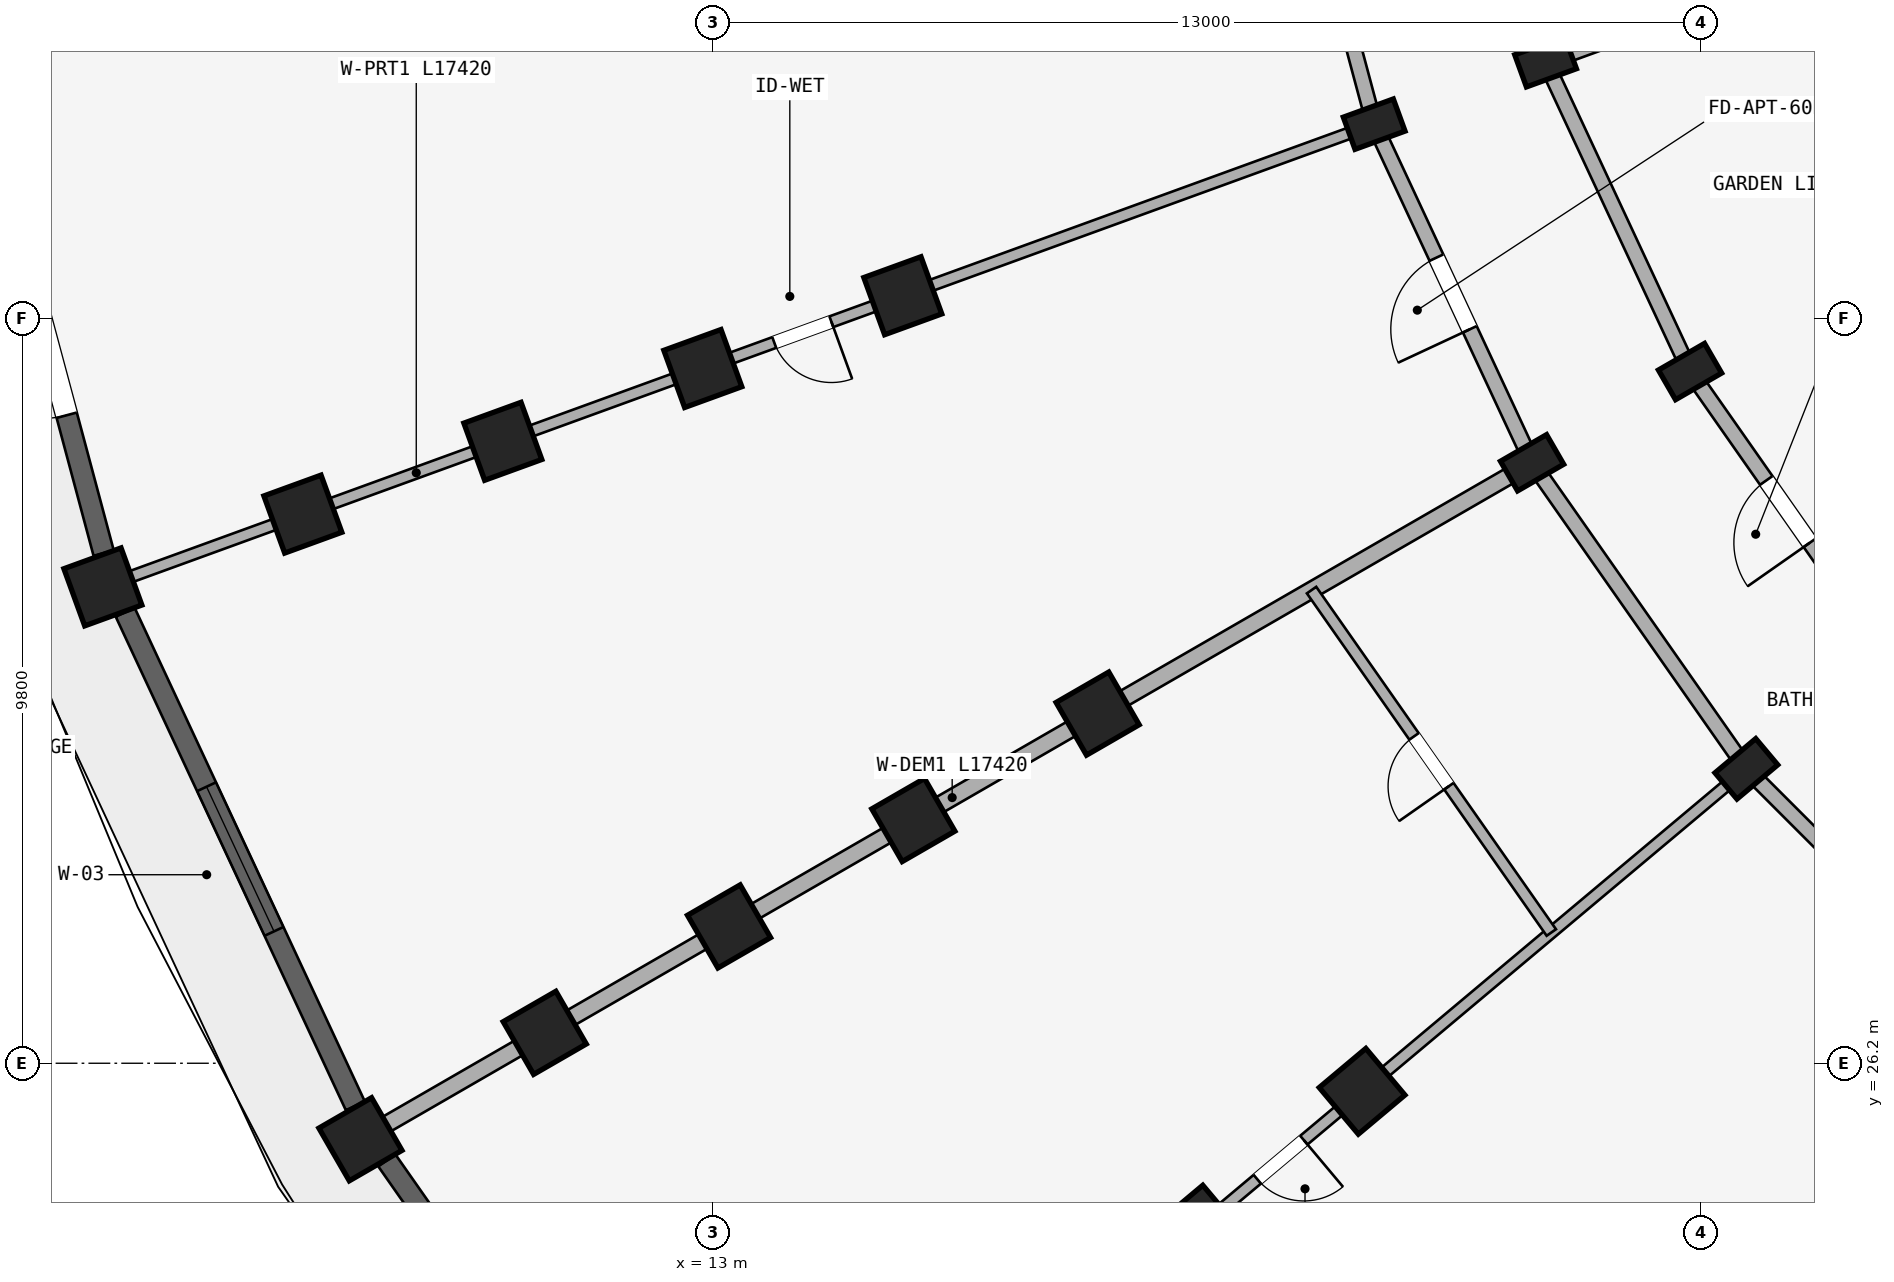
"""IFC4 building model, lengths in metres.
Left out: names, types, materials, properties, quantities, classifications, styles, units other than length and angle.
Written with IfcOpenShell. Run it as: python <this file> out.ifc"""

import sys

from ifc_helpers import new_model, si_unit, direction, frame, frame_2d, origin, origin_2d, place, context, subcontext, project, spatial, rectangle, extrude, element, fill, save


model = new_model("IFC4")
c1 = context("Model", 3, precision=1e-05, world=origin(), true_north=direction((0.0, 1.0)))
c2 = subcontext(c1, "Body", "Model", "MODEL_VIEW")
j1 = project(units=[si_unit("LENGTHUNIT", "METRE"), si_unit("PLANEANGLEUNIT", "RADIAN")], contexts=[c1])
p1 = place(None, origin())
s1 = spatial("IfcSite", under=j1, at=p1, CompositionType="ELEMENT")
p2 = place(p1, origin())
s2 = spatial("IfcBuilding", under=s1, at=p2, CompositionType="ELEMENT")
p3 = place(p2, frame((0.0, 0.0, 15.0)))
s3 = spatial("IfcBuildingStorey", under=s2, at=p3, CompositionType="ELEMENT", Elevation=15.0)
p4 = place(p3, frame((26.598, 30.073, 0.0), z_axis=(0.0, 0.0, 1.0), x_axis=(-0.642787609687, 0.766044443119, 0.0)))
e1 = element("IfcColumn", 1, at=p4, inside=s3, PredefinedType="COLUMN", context=c2, shape_type="SweptSolid", body=[
    extrude(rectangle(XDim=0.45, YDim=0.7, at=origin_2d()), origin(), (0.0, 0.0, 1.0), 2.93),
])
for number, where, z_axis, x_axis in (
    (2, (21.542, 25.831, 0.0), (0.0, 0.0, 1.0), (-0.643, 0.766, 0.0)),
    (3, (19.397, 24.031, 0.0), (0.0, 0.0, 1.0), (-0.643, 0.766, 0.0)),
):
    element("IfcColumn", number, at=place(p3, frame(where, z_axis=z_axis, x_axis=x_axis)), inside=s3, PredefinedType="COLUMN", context=c2, shape_type="SweptSolid", body=[
        extrude(rectangle(XDim=0.8, YDim=0.8, at=origin_2d()), origin(), (0.0, 0.0, 1.0), 2.93),
    ])
for number, where, z_axis, x_axis in (
    (4, (25.856, 35.3, 0.0), (0.0, 0.0, 1.0), (-0.5, 0.866, 0.0)),
    (5, (23.778, 34.1, 0.0), (0.0, 0.0, 1.0), (-0.5, 0.866, 0.0)),
):
    element("IfcColumn", number, at=place(p3, frame(where, z_axis=z_axis, x_axis=x_axis)), inside=s3, PredefinedType="COLUMN", context=c2, shape_type="SweptSolid", body=[
        extrude(rectangle(XDim=0.45, YDim=0.7, at=origin_2d()), origin(), (0.0, 0.0, 1.0), 2.93),
    ])
for number, where, z_axis, x_axis in (
    (6, (18.062, 30.8, 0.0), (0.0, 0.0, 1.0), (-0.5, 0.866, 0.0)),
    (7, (15.637, 29.4, 0.0), (0.0, 0.0, 1.0), (-0.5, 0.866, 0.0)),
    (8, (13.213, 28.0, 0.0), (0.0, 0.0, 1.0), (-0.5, 0.866, 0.0)),
    (9, (10.788, 26.6, 0.0), (0.0, 0.0, 1.0), (-0.5, 0.866, 0.0)),
    (10, (8.363, 25.2, 0.0), (0.0, 0.0, 1.0), (-0.5, 0.866, 0.0)),
):
    element("IfcColumn", number, at=place(p3, frame(where, z_axis=z_axis, x_axis=x_axis)), inside=s3, PredefinedType="COLUMN", context=c2, shape_type="SweptSolid", body=[
        extrude(rectangle(XDim=0.8, YDim=0.8, at=origin_2d()), origin(), (0.0, 0.0, 1.0), 2.93),
    ])
for number, where, z_axis, x_axis in (
    (11, (23.956, 39.376, 0.0), (0.0, 0.0, 1.0), (-0.342, 0.94, 0.0)),
    (12, (21.701, 38.555, 0.0), (0.0, 0.0, 1.0), (-0.342, 0.94, 0.0)),
):
    element("IfcColumn", number, at=place(p3, frame(where, z_axis=z_axis, x_axis=x_axis)), inside=s3, PredefinedType="COLUMN", context=c2, shape_type="SweptSolid", body=[
        extrude(rectangle(XDim=0.45, YDim=0.7, at=origin_2d()), origin(), (0.0, 0.0, 1.0), 2.93),
    ])
for number, where, z_axis, x_axis in (
    (13, (15.499, 36.298, 0.0), (0.0, 0.0, 1.0), (-0.342, 0.94, 0.0)),
    (14, (12.868, 35.34, 0.0), (0.0, 0.0, 1.0), (-0.342, 0.94, 0.0)),
    (15, (10.236, 34.382, 0.0), (0.0, 0.0, 1.0), (-0.342, 0.94, 0.0)),
    (16, (7.605, 33.425, 0.0), (0.0, 0.0, 1.0), (-0.342, 0.94, 0.0)),
    (17, (4.974, 32.467, 0.0), (0.0, 0.0, 1.0), (-0.342, 0.94, 0.0)),
):
    element("IfcColumn", number, at=place(p3, frame(where, z_axis=z_axis, x_axis=x_axis)), inside=s3, PredefinedType="COLUMN", context=c2, shape_type="SweptSolid", body=[
        extrude(rectangle(XDim=0.8, YDim=0.8, at=origin_2d()), origin(), (0.0, 0.0, 1.0), 2.93),
    ])
p5 = place(p3, frame((30.073, 26.598, 0.0), z_axis=(0.0, 0.0, 1.0), x_axis=(-0.707106781187, 0.707106781187, 0.0)))
e18 = element("IfcWall", 18, at=p5, inside=s3, PredefinedType="STANDARD", context=c2, shape_type="SweptSolid", body=[
    extrude(rectangle(XDim=4.916, YDim=0.2, at=frame_2d((2.458, 0.0))), origin(), (0.0, 0.0, 1.0), 2.372),
])
p6 = place(p5, frame((1.958, 0.0, 0.0)))
e19 = element("IfcOpeningElement", 19, at=p6, cuts=e18, PredefinedType="OPENING", context=c2, shape_type="SweptSolid", body=[
    extrude(rectangle(XDim=1.0, YDim=2.15, at=frame_2d((0.5, 1.075))), frame((0.0, 0.11, 0.0), z_axis=(0.0, -1.0, 0.0), x_axis=(1.0, 0.0, 0.0)), (0.0, 0.0, 1.0), 0.22),
])
p7 = place(p3, frame((28.436, 31.616, 0.0), z_axis=(0.0, 0.0, 1.0), x_axis=(-0.573571637217, 0.819155404658, 0.0)))
e20 = element("IfcWall", 20, at=p7, inside=s3, PredefinedType="STANDARD", context=c2, shape_type="SweptSolid", body=[
    extrude(rectangle(XDim=4.497, YDim=0.2, at=frame_2d((2.249, 0.0))), origin(), (0.0, 0.0, 1.0), 2.372),
])
p8 = place(p7, frame((1.749, 0.0, 0.0)))
e21 = element("IfcOpeningElement", 21, at=p8, cuts=e20, PredefinedType="OPENING", context=c2, shape_type="SweptSolid", body=[
    extrude(rectangle(XDim=1.0, YDim=2.15, at=frame_2d((0.5, 1.075))), frame((0.0, 0.11, 0.0), z_axis=(0.0, -1.0, 0.0), x_axis=(1.0, 0.0, 0.0)), (0.0, 0.0, 1.0), 0.22),
])
p9 = place(p3, frame((26.598, 30.073, 0.0), z_axis=(0.0, 0.0, 1.0), x_axis=(-0.573592335331, 0.819140911474, 0.0)))
e22 = element("IfcWall", 22, at=p9, inside=s3, PredefinedType="STANDARD", context=c2, shape_type="SweptSolid", body=[
    extrude(rectangle(XDim=4.916, YDim=0.2, at=frame_2d((2.458, 0.0))), origin(), (0.0, 0.0, 1.0), 2.372),
])
p10 = place(p3, frame((25.856, 35.3, 0.0), z_axis=(0.0, 0.0, 1.0), x_axis=(-0.422617978463, 0.906307919131, 0.0)))
e23 = element("IfcWall", 23, at=p10, inside=s3, PredefinedType="STANDARD", context=c2, shape_type="SweptSolid", body=[
    extrude(rectangle(XDim=4.497, YDim=0.2, at=frame_2d((2.249, 0.0))), origin(), (0.0, 0.0, 1.0), 2.372),
])
p11 = place(p3, frame((23.778, 34.1, 0.0), z_axis=(0.0, 0.0, 1.0), x_axis=(-0.422629854778, 0.906302381024, 0.0)))
e24 = element("IfcWall", 24, at=p11, inside=s3, PredefinedType="STANDARD", context=c2, shape_type="SweptSolid", body=[
    extrude(rectangle(XDim=4.915, YDim=0.2, at=frame_2d((2.458, 0.0))), origin(), (0.0, 0.0, 1.0), 2.372),
])
p12 = place(p11, frame((1.938, 0.0, 0.0)))
e25 = element("IfcOpeningElement", 25, at=p12, cuts=e24, PredefinedType="OPENING", context=c2, shape_type="SweptSolid", body=[
    extrude(rectangle(XDim=1.04, YDim=2.15, at=frame_2d((0.52, 1.075))), frame((0.0, 0.11, 0.0), z_axis=(0.0, -1.0, 0.0), x_axis=(1.0, 0.0, 0.0)), (0.0, 0.0, 1.0), 0.22),
])
p13 = place(p3, frame((23.956, 39.376, 0.0), z_axis=(0.0, 0.0, 1.0), x_axis=(-0.258787642463, 0.965934240054, 0.0)))
e26 = element("IfcWall", 26, at=p13, inside=s3, PredefinedType="STANDARD", context=c2, shape_type="SweptSolid", body=[
    extrude(rectangle(XDim=4.497, YDim=0.2, at=frame_2d((2.249, 0.0))), origin(), (0.0, 0.0, 1.0), 2.372),
])
p14 = place(p13, frame((1.729, 0.0, 0.0)))
e27 = element("IfcOpeningElement", 27, at=p14, cuts=e26, PredefinedType="OPENING", context=c2, shape_type="SweptSolid", body=[
    extrude(rectangle(XDim=1.04, YDim=2.15, at=frame_2d((0.52, 1.075))), frame((0.0, 0.11, 0.0), z_axis=(0.0, -1.0, 0.0), x_axis=(1.0, 0.0, 0.0)), (0.0, 0.0, 1.0), 0.22),
])
p15 = place(p3, frame((21.701, 38.555, 0.0), z_axis=(0.0, 0.0, 1.0), x_axis=(-0.258803112091, 0.965930095386, 0.0)))
e28 = element("IfcWall", 28, at=p15, inside=s3, PredefinedType="STANDARD", context=c2, shape_type="SweptSolid", body=[
    extrude(rectangle(XDim=4.916, YDim=0.2, at=frame_2d((2.458, 0.0))), origin(), (0.0, 0.0, 1.0), 2.372),
])
p16 = place(p3, frame((30.009, 26.521, 0.0), z_axis=(0.0, 0.0, 1.0), x_axis=(-0.642784757967, -0.766046835987, 0.0)))
e29 = element("IfcWall", 29, at=p16, inside=s3, PredefinedType="STANDARD", context=c2, shape_type="SweptSolid", body=[
    extrude(rectangle(XDim=17.42, YDim=0.22, at=frame_2d((8.71, 0.0))), origin(), (0.0, 0.0, 1.0), 2.372),
])
p17 = place(p3, frame((26.521, 30.009, 0.0), z_axis=(0.0, 0.0, 1.0), x_axis=(-0.766046835987, -0.642784757967, 0.0)))
e30 = element("IfcWall", 30, at=p17, inside=s3, PredefinedType="PARTITIONING", context=c2, shape_type="SweptSolid", body=[
    extrude(rectangle(XDim=17.42, YDim=0.15, at=frame_2d((8.71, 0.0))), origin(), (0.0, 0.0, 1.0), 2.372),
])
p18 = place(p17, frame((7.5, 0.0, 0.0)))
e31 = element("IfcOpeningElement", 31, at=p18, cuts=e30, PredefinedType="OPENING", context=c2, shape_type="SweptSolid", body=[
    extrude(rectangle(XDim=0.8, YDim=2.1, at=frame_2d((0.4, 1.05))), frame((0.0, 0.085, 0.0), z_axis=(0.0, -1.0, 0.0), x_axis=(1.0, 0.0, 0.0)), (0.0, 0.0, 1.0), 0.17),
])
p19 = place(p3, frame((23.691, 34.05, 0.0), z_axis=(0.0, 0.0, 1.0), x_axis=(-0.866026648973, -0.499997843263, 0.0)))
e32 = element("IfcWall", 32, at=p19, inside=s3, PredefinedType="STANDARD", context=c2, shape_type="SweptSolid", body=[
    extrude(rectangle(XDim=17.42, YDim=0.22, at=frame_2d((8.71, 0.0))), origin(), (0.0, 0.0, 1.0), 2.372),
])
p20 = place(p3, frame((30.346, 41.702, 0.0), z_axis=(0.0, 0.0, 1.0), x_axis=(-0.939696231917, -0.342010221662, 0.0)))
e33 = element("IfcWall", 33, at=p20, inside=s3, PredefinedType="STANDARD", context=c2, shape_type="SweptSolid", body=[
    extrude(rectangle(XDim=6.75, YDim=0.22, at=frame_2d((3.375, 0.0))), origin(), (0.0, 0.0, 1.0), 2.372),
])
p21 = place(p3, frame((21.607, 38.521, 0.0), z_axis=(0.0, 0.0, 1.0), x_axis=(-0.939691901159, -0.342022120477, 0.0)))
e34 = element("IfcWall", 34, at=p21, inside=s3, PredefinedType="PARTITIONING", context=c2, shape_type="SweptSolid", body=[
    extrude(rectangle(XDim=17.42, YDim=0.15, at=frame_2d((8.71, 0.0))), origin(), (0.0, 0.0, 1.0), 2.372),
])
p22 = place(p21, frame((7.5, 0.0, 0.0)))
e35 = element("IfcOpeningElement", 35, at=p22, cuts=e34, PredefinedType="OPENING", context=c2, shape_type="SweptSolid", body=[
    extrude(rectangle(XDim=0.8, YDim=2.1, at=frame_2d((0.4, 1.05))), frame((0.0, 0.085, 0.0), z_axis=(0.0, -1.0, 0.0), x_axis=(1.0, 0.0, 0.0)), (0.0, 0.0, 1.0), 0.17),
])
p23 = place(p3, frame((24.031, 27.92, 0.0), z_axis=(0.0, 0.0, 1.0), x_axis=(-0.573569599955, 0.819156831143, 0.0)))
e36 = element("IfcWall", 36, at=p23, inside=s3, PredefinedType="PLUMBINGWALL", context=c2, shape_type="SweptSolid", body=[
    extrude(rectangle(XDim=5.5, YDim=0.15, at=frame_2d((2.75, 0.0))), origin(), (0.0, 0.0, 1.0), 2.372),
])
p24 = place(p23, frame((2.35, 0.0, 0.0)))
e37 = element("IfcOpeningElement", 37, at=p24, cuts=e36, PredefinedType="OPENING", context=c2, shape_type="SweptSolid", body=[
    extrude(rectangle(XDim=0.8, YDim=2.1, at=frame_2d((0.4, 1.05))), frame((0.0, 0.085, 0.0), z_axis=(0.0, -1.0, 0.0), x_axis=(1.0, 0.0, 0.0)), (0.0, 0.0, 1.0), 0.17),
])
p25 = place(p3, frame((12.819, 19.053, 0.0), z_axis=(0.0, 0.0, 1.0), x_axis=(-0.573562972382, 0.819161471697, 0.0)))
e38 = element("IfcWall", 38, at=p25, inside=s3, PredefinedType="STANDARD", context=c2, shape_type="SweptSolid", body=[
    extrude(rectangle(XDim=7.164, YDim=0.275, at=frame_2d((3.582, 0.0))), origin(), (0.0, 0.0, 1.0), 2.472),
])
p26 = place(p25, frame((2.457, 0.0, 0.322)))
e39 = element("IfcOpeningElement", 39, at=p26, cuts=e38, PredefinedType="OPENING", context=c2, shape_type="SweptSolid", body=[
    extrude(rectangle(XDim=2.25, YDim=1.95, at=frame_2d((1.125, 0.975))), frame((0.0, 0.147, 0.0), z_axis=(0.0, -1.0, 0.0), x_axis=(1.0, 0.0, 0.0)), (0.0, 0.0, 1.0), 0.295),
])
p27 = place(p3, frame((8.296, 25.64, 0.0), z_axis=(0.0, 0.0, 1.0), x_axis=(-0.422633596215, 0.906300636296, 0.0)))
e40 = element("IfcWall", 40, at=p27, inside=s3, PredefinedType="STANDARD", context=c2, shape_type="SweptSolid", body=[
    extrude(rectangle(XDim=7.164, YDim=0.275, at=frame_2d((3.582, 0.0))), origin(), (0.0, 0.0, 1.0), 2.472),
])
p28 = place(p27, frame((2.532, 0.0, 0.472)))
e41 = element("IfcOpeningElement", 41, at=p28, cuts=e40, PredefinedType="OPENING", context=c2, shape_type="SweptSolid", body=[
    extrude(rectangle(XDim=2.1, YDim=1.8, at=frame_2d((1.05, 0.9))), frame((0.0, 0.147, 0.0), z_axis=(0.0, -1.0, 0.0), x_axis=(1.0, 0.0, 0.0)), (0.0, 0.0, 1.0), 0.295),
])
p29 = place(p3, frame((4.984, 32.912, 0.0), z_axis=(0.0, 0.0, 1.0), x_axis=(-0.258826933296, 0.965923712619, 0.0)))
e42 = element("IfcWall", 42, at=p29, inside=s3, PredefinedType="STANDARD", context=c2, shape_type="SweptSolid", body=[
    extrude(rectangle(XDim=7.164, YDim=0.275, at=frame_2d((3.582, 0.0))), origin(), (0.0, 0.0, 1.0), 2.472),
])
p30 = place(p29, frame((4.69, 0.0, 0.422)))
e43 = element("IfcOpeningElement", 43, at=p30, cuts=e42, PredefinedType="OPENING", context=c2, shape_type="SweptSolid", body=[
    extrude(rectangle(XDim=1.2, YDim=1.5, at=frame_2d((0.6, 0.75))), frame((0.0, 0.147, 0.0), z_axis=(0.0, -1.0, 0.0), x_axis=(1.0, 0.0, 0.0)), (0.0, 0.0, 1.0), 0.295),
])
p31 = place(p29, frame((1.877, 0.0, 0.0)))
e44 = element("IfcOpeningElement", 44, at=p31, cuts=e42, PredefinedType="OPENING", context=c2, shape_type="SweptSolid", body=[
    extrude(rectangle(XDim=1.26, YDim=2.15, at=frame_2d((0.63, 1.075))), frame((0.0, 0.147, 0.0), z_axis=(0.0, -1.0, 0.0), x_axis=(1.0, 0.0, 0.0)), (0.0, 0.0, 1.0), 0.295),
])
p32 = place(p28, origin())
e45 = element("IfcWindow", 45, at=p32, inside=s3, PartitioningType="TRIPLE_PANEL_VERTICAL", PredefinedType="WINDOW", context=c2, shape_type="SweptSolid", body=[
    extrude(rectangle(XDim=2.1, YDim=1.8, at=frame_2d((1.05, 0.9))), frame((0.0, 0.03, 0.0), z_axis=(0.0, -1.0, 0.0), x_axis=(1.0, 0.0, 0.0)), (0.0, 0.0, 1.0), 0.06),
])
fill(e41, e45)
p33 = place(p18, frame((0.8, 0.0, 0.0), z_axis=(0.0, 0.0, 1.0), x_axis=(-1.0, 0.0, 0.0)))
e46 = element("IfcDoor", 46, at=p33, inside=s3, OperationType="SINGLE_SWING_RIGHT", PredefinedType="DOOR", context=c2, shape_type="SweptSolid", body=[
    extrude(rectangle(XDim=0.8, YDim=2.1, at=frame_2d((0.4, 1.05))), frame((0.0, 0.025, 0.0), z_axis=(0.0, -1.0, 0.0), x_axis=(1.0, 0.0, 0.0)), (0.0, 0.0, 1.0), 0.05),
])
fill(e31, e46)
p34 = place(p22, origin())
e47 = element("IfcDoor", 47, at=p34, inside=s3, OperationType="SINGLE_SWING_LEFT", PredefinedType="DOOR", context=c2, shape_type="SweptSolid", body=[
    extrude(rectangle(XDim=0.8, YDim=2.1, at=frame_2d((0.4, 1.05))), frame((0.0, 0.025, 0.0), z_axis=(0.0, -1.0, 0.0), x_axis=(1.0, 0.0, 0.0)), (0.0, 0.0, 1.0), 0.05),
])
fill(e35, e47)
p35 = place(p24, origin())
e48 = element("IfcDoor", 48, at=p35, inside=s3, OperationType="SINGLE_SWING_LEFT", PredefinedType="DOOR", context=c2, shape_type="SweptSolid", body=[
    extrude(rectangle(XDim=0.8, YDim=2.1, at=frame_2d((0.4, 1.05))), frame((0.0, 0.025, 0.0), z_axis=(0.0, -1.0, 0.0), x_axis=(1.0, 0.0, 0.0)), (0.0, 0.0, 1.0), 0.05),
])
fill(e37, e48)
p36 = place(p12, frame((1.04, 0.0, 0.0), z_axis=(0.0, 0.0, 1.0), x_axis=(-1.0, 0.0, 0.0)))
e49 = element("IfcDoor", 49, at=p36, inside=s3, OperationType="SINGLE_SWING_RIGHT", PredefinedType="DOOR", context=c2, shape_type="SweptSolid", body=[
    extrude(rectangle(XDim=1.04, YDim=2.15, at=frame_2d((0.52, 1.075))), frame((0.0, 0.025, 0.0), z_axis=(0.0, -1.0, 0.0), x_axis=(1.0, 0.0, 0.0)), (0.0, 0.0, 1.0), 0.05),
])
fill(e25, e49)
p37 = place(p8, frame((1.0, 0.0, 0.0), z_axis=(0.0, 0.0, 1.0), x_axis=(-1.0, 0.0, 0.0)))
e50 = element("IfcDoor", 50, at=p37, inside=s3, OperationType="SINGLE_SWING_RIGHT", PredefinedType="DOOR", context=c2, shape_type="SweptSolid", body=[
    extrude(rectangle(XDim=1.0, YDim=2.15, at=frame_2d((0.5, 1.075))), frame((0.0, 0.025, 0.0), z_axis=(0.0, -1.0, 0.0), x_axis=(1.0, 0.0, 0.0)), (0.0, 0.0, 1.0), 0.05),
])
fill(e21, e50)
p38 = place(p31, origin())
e51 = element("IfcDoor", 51, at=p38, inside=s3, OperationType="SINGLE_SWING_RIGHT", PredefinedType="DOOR", context=c2, shape_type="SweptSolid", body=[
    extrude(rectangle(XDim=1.26, YDim=2.15, at=frame_2d((0.63, 1.075))), frame((0.0, 0.025, 0.0), z_axis=(0.0, -1.0, 0.0), x_axis=(1.0, 0.0, 0.0)), (0.0, 0.0, 1.0), 0.05),
])
fill(e44, e51)
save(model, sys.argv[1])
